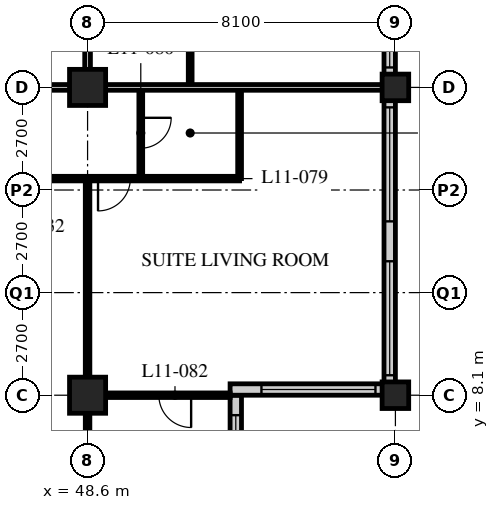
"""IFC4 building model, lengths in metres.
Left out: names, types, materials, properties, quantities, classifications, styles, units other than length and angle.
Written with IfcOpenShell. Run it as: python <this file> out.ifc"""

import sys

from ifc_helpers import new_model, si_unit, direction, frame, frame_2d, origin, origin_2d, place, context, subcontext, project, spatial, rectangle, hollow_rectangle, extrude, element, fill, save


model = new_model("IFC4")
c1 = context("Model", 3, precision=1e-05, world=origin(), true_north=direction((0.0, 1.0)))
c2 = subcontext(c1, "Body", "Model", "MODEL_VIEW")
j1 = project(units=[si_unit("LENGTHUNIT", "METRE"), si_unit("PLANEANGLEUNIT", "RADIAN")], contexts=[c1])
p1 = place(None, origin())
s1 = spatial("IfcSite", under=j1, at=p1, CompositionType="ELEMENT")
p2 = place(p1, origin())
s2 = spatial("IfcBuilding", under=s1, at=p2, CompositionType="ELEMENT")
p3 = place(p2, frame((0.0, 0.0, 50.0)))
s3 = spatial("IfcBuildingStorey", under=s2, at=p3, CompositionType="ELEMENT", Elevation=50.0)
for number, where, z_axis, x_axis in (
    (1, (48.6, 8.1, 0.0), (0.0, 0.0, 1.0), (1.0, 0.0, 0.0)),
    (2, (48.6, 16.2, 0.0), (0.0, 0.0, 1.0), (1.0, 0.0, 0.0)),
):
    element("IfcColumn", number, at=place(p3, frame(where, z_axis=z_axis, x_axis=x_axis)), inside=s3, PredefinedType="COLUMN", context=c2, shape_type="SweptSolid", body=[
        extrude(hollow_rectangle(XDim=0.95, YDim=0.95, WallThickness=0.095, at=origin_2d()), origin(), (0.0, 0.0, 1.0), 3.4),
    ])
for number, where, z_axis, x_axis in (
    (3, (56.7, 8.1, 0.0), (0.0, 0.0, 1.0), (1.0, 0.0, 0.0)),
    (4, (56.7, 16.2, 0.0), (0.0, 0.0, 1.0), (1.0, 0.0, 0.0)),
):
    element("IfcColumn", number, at=place(p3, frame(where, z_axis=z_axis, x_axis=x_axis)), inside=s3, PredefinedType="COLUMN", context=c2, shape_type="SweptSolid", body=[
        extrude(hollow_rectangle(XDim=0.7, YDim=0.7, WallThickness=0.06, at=origin_2d()), origin(), (0.0, 0.0, 1.0), 3.4),
    ])
p4 = place(p3, frame((52.5, 4.35, 0.0), z_axis=(0.0, 0.0, 1.0), x_axis=(0.0, 1.0, 0.0)))
e5 = element("IfcWall", 5, at=p4, inside=s3, PredefinedType="SOLIDWALL", context=c2, shape_type="SweptSolid", body=[
    extrude(rectangle(XDim=3.75, YDim=0.3, at=frame_2d((1.875, 0.0))), origin(), (0.0, 0.0, 1.0), 3.19),
])
p5 = place(p4, frame((0.225, 0.0, 0.9)))
e6 = element("IfcOpeningElement", 6, at=p5, cuts=e5, PredefinedType="OPENING", context=c2, shape_type="SweptSolid", body=[
    extrude(rectangle(XDim=3.0, YDim=1.5, at=frame_2d((1.5, 0.75))), frame((0.0, 0.16, 0.0), z_axis=(0.0, -1.0, 0.0), x_axis=(1.0, 0.0, 0.0)), (0.0, 0.0, 1.0), 0.32),
])
p6 = place(p3, frame((52.35, 8.25, 0.0), z_axis=(0.0, 0.0, 1.0), x_axis=(1.0, 0.0, 0.0)))
e7 = element("IfcWall", 7, at=p6, inside=s3, PredefinedType="SOLIDWALL", context=c2, shape_type="SweptSolid", body=[
    extrude(rectangle(XDim=4.35, YDim=0.3, at=frame_2d((2.175, 0.0))), origin(), (0.0, 0.0, 1.0), 3.19),
])
p7 = place(p6, frame((0.825, 0.0, 0.9)))
e8 = element("IfcOpeningElement", 8, at=p7, cuts=e7, PredefinedType="OPENING", context=c2, shape_type="SweptSolid", body=[
    extrude(rectangle(XDim=3.0, YDim=1.5, at=frame_2d((1.5, 0.75))), frame((0.0, 0.16, 0.0), z_axis=(0.0, -1.0, 0.0), x_axis=(1.0, 0.0, 0.0)), (0.0, 0.0, 1.0), 0.32),
])
p8 = place(p3, frame((56.55, 8.4, 0.0), z_axis=(0.0, 0.0, 1.0), x_axis=(0.0, 1.0, 0.0)))
e9 = element("IfcWall", 9, at=p8, inside=s3, PredefinedType="SOLIDWALL", context=c2, shape_type="SweptSolid", body=[
    extrude(rectangle(XDim=32.1, YDim=0.3, at=frame_2d((16.05, 0.0))), origin(), (0.0, 0.0, 1.0), 3.19),
])
p9 = place(p8, frame((0.225, 0.0, 0.9)))
e10 = element("IfcOpeningElement", 10, at=p9, cuts=e9, PredefinedType="OPENING", context=c2, shape_type="SweptSolid", body=[
    extrude(rectangle(XDim=3.0, YDim=2.0, at=frame_2d((1.5, 1.0))), frame((0.0, 0.16, 0.0), z_axis=(0.0, -1.0, 0.0), x_axis=(1.0, 0.0, 0.0)), (0.0, 0.0, 1.0), 0.32),
])
p10 = place(p8, frame((4.275, 0.0, 0.9)))
e11 = element("IfcOpeningElement", 11, at=p10, cuts=e9, PredefinedType="OPENING", context=c2, shape_type="SweptSolid", body=[
    extrude(rectangle(XDim=3.0, YDim=2.0, at=frame_2d((1.5, 1.0))), frame((0.0, 0.16, 0.0), z_axis=(0.0, -1.0, 0.0), x_axis=(1.0, 0.0, 0.0)), (0.0, 0.0, 1.0), 0.32),
])
p11 = place(p8, frame((8.325, 0.0, 0.9)))
e12 = element("IfcOpeningElement", 12, at=p11, cuts=e9, PredefinedType="OPENING", context=c2, shape_type="SweptSolid", body=[
    extrude(rectangle(XDim=3.0, YDim=2.0, at=frame_2d((1.5, 1.0))), frame((0.0, 0.16, 0.0), z_axis=(0.0, -1.0, 0.0), x_axis=(1.0, 0.0, 0.0)), (0.0, 0.0, 1.0), 0.32),
])
p12 = place(p8, frame((12.375, 0.0, 0.9)))
e13 = element("IfcOpeningElement", 13, at=p12, cuts=e9, PredefinedType="OPENING", context=c2, shape_type="SweptSolid", body=[
    extrude(rectangle(XDim=3.0, YDim=2.0, at=frame_2d((1.5, 1.0))), frame((0.0, 0.16, 0.0), z_axis=(0.0, -1.0, 0.0), x_axis=(1.0, 0.0, 0.0)), (0.0, 0.0, 1.0), 0.32),
])
p13 = place(p8, frame((16.425, 0.0, 0.9)))
e14 = element("IfcOpeningElement", 14, at=p13, cuts=e9, PredefinedType="OPENING", context=c2, shape_type="SweptSolid", body=[
    extrude(rectangle(XDim=3.0, YDim=2.0, at=frame_2d((1.5, 1.0))), frame((0.0, 0.16, 0.0), z_axis=(0.0, -1.0, 0.0), x_axis=(1.0, 0.0, 0.0)), (0.0, 0.0, 1.0), 0.32),
])
p14 = place(p8, frame((20.475, 0.0, 0.9)))
e15 = element("IfcOpeningElement", 15, at=p14, cuts=e9, PredefinedType="OPENING", context=c2, shape_type="SweptSolid", body=[
    extrude(rectangle(XDim=3.0, YDim=2.0, at=frame_2d((1.5, 1.0))), frame((0.0, 0.16, 0.0), z_axis=(0.0, -1.0, 0.0), x_axis=(1.0, 0.0, 0.0)), (0.0, 0.0, 1.0), 0.32),
])
p15 = place(p8, frame((24.525, 0.0, 0.9)))
e16 = element("IfcOpeningElement", 16, at=p15, cuts=e9, PredefinedType="OPENING", context=c2, shape_type="SweptSolid", body=[
    extrude(rectangle(XDim=3.0, YDim=2.0, at=frame_2d((1.5, 1.0))), frame((0.0, 0.16, 0.0), z_axis=(0.0, -1.0, 0.0), x_axis=(1.0, 0.0, 0.0)), (0.0, 0.0, 1.0), 0.32),
])
p16 = place(p8, frame((28.575, 0.0, 0.9)))
e17 = element("IfcOpeningElement", 17, at=p16, cuts=e9, PredefinedType="OPENING", context=c2, shape_type="SweptSolid", body=[
    extrude(rectangle(XDim=3.0, YDim=2.0, at=frame_2d((1.5, 1.0))), frame((0.0, 0.16, 0.0), z_axis=(0.0, -1.0, 0.0), x_axis=(1.0, 0.0, 0.0)), (0.0, 0.0, 1.0), 0.32),
])
p17 = place(p3, frame((8.1, 16.2, 0.0), z_axis=(0.0, 0.0, 1.0), x_axis=(1.0, 0.0, 0.0)))
e18 = element("IfcWall", 18, at=p17, inside=s3, PredefinedType="PARTITIONING", context=c2, shape_type="SweptSolid", body=[
    extrude(rectangle(XDim=40.5, YDim=0.15, at=frame_2d((20.25, 0.0))), origin(), (0.0, 0.0, 1.0), 2.578),
])
p18 = place(p17, frame((4.35, 0.0, 0.0)))
e19 = element("IfcOpeningElement", 19, at=p18, cuts=e18, PredefinedType="OPENING", context=c2, shape_type="SweptSolid", body=[
    extrude(rectangle(XDim=1.0, YDim=2.1, at=frame_2d((0.5, 1.05))), frame((0.0, 0.085, 0.0), z_axis=(0.0, -1.0, 0.0), x_axis=(1.0, 0.0, 0.0)), (0.0, 0.0, 1.0), 0.17),
])
p19 = place(p17, frame((10.85, 0.0, 0.0)))
e20 = element("IfcOpeningElement", 20, at=p19, cuts=e18, PredefinedType="OPENING", context=c2, shape_type="SweptSolid", body=[
    extrude(rectangle(XDim=1.0, YDim=2.1, at=frame_2d((0.5, 1.05))), frame((0.0, 0.085, 0.0), z_axis=(0.0, -1.0, 0.0), x_axis=(1.0, 0.0, 0.0)), (0.0, 0.0, 1.0), 0.17),
])
p20 = place(p17, frame((12.75, 0.0, 0.0)))
e21 = element("IfcOpeningElement", 21, at=p20, cuts=e18, PredefinedType="OPENING", context=c2, shape_type="SweptSolid", body=[
    extrude(rectangle(XDim=1.0, YDim=2.1, at=frame_2d((0.5, 1.05))), frame((0.0, 0.085, 0.0), z_axis=(0.0, -1.0, 0.0), x_axis=(1.0, 0.0, 0.0)), (0.0, 0.0, 1.0), 0.17),
])
p21 = place(p17, frame((18.95, 0.0, 0.0)))
e22 = element("IfcOpeningElement", 22, at=p21, cuts=e18, PredefinedType="OPENING", context=c2, shape_type="SweptSolid", body=[
    extrude(rectangle(XDim=1.0, YDim=2.1, at=frame_2d((0.5, 1.05))), frame((0.0, 0.085, 0.0), z_axis=(0.0, -1.0, 0.0), x_axis=(1.0, 0.0, 0.0)), (0.0, 0.0, 1.0), 0.17),
])
p22 = place(p17, frame((20.55, 0.0, 0.0)))
e23 = element("IfcOpeningElement", 23, at=p22, cuts=e18, PredefinedType="OPENING", context=c2, shape_type="SweptSolid", body=[
    extrude(rectangle(XDim=1.0, YDim=2.1, at=frame_2d((0.5, 1.05))), frame((0.0, 0.085, 0.0), z_axis=(0.0, -1.0, 0.0), x_axis=(1.0, 0.0, 0.0)), (0.0, 0.0, 1.0), 0.17),
])
p23 = place(p17, frame((27.05, 0.0, 0.0)))
e24 = element("IfcOpeningElement", 24, at=p23, cuts=e18, PredefinedType="OPENING", context=c2, shape_type="SweptSolid", body=[
    extrude(rectangle(XDim=1.0, YDim=2.1, at=frame_2d((0.5, 1.05))), frame((0.0, 0.085, 0.0), z_axis=(0.0, -1.0, 0.0), x_axis=(1.0, 0.0, 0.0)), (0.0, 0.0, 1.0), 0.17),
])
p24 = place(p17, frame((28.95, 0.0, 0.0)))
e25 = element("IfcOpeningElement", 25, at=p24, cuts=e18, PredefinedType="OPENING", context=c2, shape_type="SweptSolid", body=[
    extrude(rectangle(XDim=1.0, YDim=2.1, at=frame_2d((0.5, 1.05))), frame((0.0, 0.085, 0.0), z_axis=(0.0, -1.0, 0.0), x_axis=(1.0, 0.0, 0.0)), (0.0, 0.0, 1.0), 0.17),
])
p25 = place(p17, frame((34.85, 0.0, 0.0)))
e26 = element("IfcOpeningElement", 26, at=p25, cuts=e18, PredefinedType="OPENING", context=c2, shape_type="SweptSolid", body=[
    extrude(rectangle(XDim=1.0, YDim=2.1, at=frame_2d((0.5, 1.05))), frame((0.0, 0.085, 0.0), z_axis=(0.0, -1.0, 0.0), x_axis=(1.0, 0.0, 0.0)), (0.0, 0.0, 1.0), 0.17),
])
p26 = place(p17, frame((1.525, 0.0, 0.0)))
e27 = element("IfcOpeningElement", 27, at=p26, cuts=e18, PredefinedType="OPENING", context=c2, shape_type="SweptSolid", body=[
    extrude(rectangle(XDim=1.0, YDim=2.1, at=frame_2d((0.5, 1.05))), frame((0.0, 0.085, 0.0), z_axis=(0.0, -1.0, 0.0), x_axis=(1.0, 0.0, 0.0)), (0.0, 0.0, 1.0), 0.17),
])
p27 = place(p17, frame((37.975, 0.0, 0.0)))
e28 = element("IfcOpeningElement", 28, at=p27, cuts=e18, PredefinedType="OPENING", context=c2, shape_type="SweptSolid", body=[
    extrude(rectangle(XDim=1.0, YDim=2.1, at=frame_2d((0.5, 1.05))), frame((0.0, 0.085, 0.0), z_axis=(0.0, -1.0, 0.0), x_axis=(1.0, 0.0, 0.0)), (0.0, 0.0, 1.0), 0.17),
])
p28 = place(p3, frame((48.6, 16.2, 0.0), z_axis=(0.0, 0.0, 1.0), x_axis=(0.0, 1.0, 0.0)))
e29 = element("IfcWall", 29, at=p28, inside=s3, PredefinedType="PARTITIONING", context=c2, shape_type="SweptSolid", body=[
    extrude(rectangle(XDim=26.1, YDim=0.15, at=frame_2d((13.05, 0.0))), origin(), (0.0, 0.0, 1.0), 2.578),
])
p29 = place(p28, frame((2.75, 0.0, 0.0)))
e30 = element("IfcOpeningElement", 30, at=p29, cuts=e29, PredefinedType="OPENING", context=c2, shape_type="SweptSolid", body=[
    extrude(rectangle(XDim=1.0, YDim=2.1, at=frame_2d((0.5, 1.05))), frame((0.0, 0.085, 0.0), z_axis=(0.0, -1.0, 0.0), x_axis=(1.0, 0.0, 0.0)), (0.0, 0.0, 1.0), 0.17),
])
p30 = place(p28, frame((4.35, 0.0, 0.0)))
e31 = element("IfcOpeningElement", 31, at=p30, cuts=e29, PredefinedType="OPENING", context=c2, shape_type="SweptSolid", body=[
    extrude(rectangle(XDim=1.0, YDim=2.1, at=frame_2d((0.5, 1.05))), frame((0.0, 0.085, 0.0), z_axis=(0.0, -1.0, 0.0), x_axis=(1.0, 0.0, 0.0)), (0.0, 0.0, 1.0), 0.17),
])
p31 = place(p28, frame((10.85, 0.0, 0.0)))
e32 = element("IfcOpeningElement", 32, at=p31, cuts=e29, PredefinedType="OPENING", context=c2, shape_type="SweptSolid", body=[
    extrude(rectangle(XDim=1.0, YDim=2.1, at=frame_2d((0.5, 1.05))), frame((0.0, 0.085, 0.0), z_axis=(0.0, -1.0, 0.0), x_axis=(1.0, 0.0, 0.0)), (0.0, 0.0, 1.0), 0.17),
])
p32 = place(p28, frame((12.45, 0.0, 0.0)))
e33 = element("IfcOpeningElement", 33, at=p32, cuts=e29, PredefinedType="OPENING", context=c2, shape_type="SweptSolid", body=[
    extrude(rectangle(XDim=1.0, YDim=2.1, at=frame_2d((0.5, 1.05))), frame((0.0, 0.085, 0.0), z_axis=(0.0, -1.0, 0.0), x_axis=(1.0, 0.0, 0.0)), (0.0, 0.0, 1.0), 0.17),
])
p33 = place(p28, frame((18.65, 0.0, 0.0)))
e34 = element("IfcOpeningElement", 34, at=p33, cuts=e29, PredefinedType="OPENING", context=c2, shape_type="SweptSolid", body=[
    extrude(rectangle(XDim=1.0, YDim=2.1, at=frame_2d((0.5, 1.05))), frame((0.0, 0.085, 0.0), z_axis=(0.0, -1.0, 0.0), x_axis=(1.0, 0.0, 0.0)), (0.0, 0.0, 1.0), 0.17),
])
p34 = place(p28, frame((22.7, 0.0, 0.0)))
e35 = element("IfcOpeningElement", 35, at=p34, cuts=e29, PredefinedType="OPENING", context=c2, shape_type="SweptSolid", body=[
    extrude(rectangle(XDim=1.0, YDim=2.1, at=frame_2d((0.5, 1.05))), frame((0.0, 0.085, 0.0), z_axis=(0.0, -1.0, 0.0), x_axis=(1.0, 0.0, 0.0)), (0.0, 0.0, 1.0), 0.17),
])
p35 = place(p3, frame((51.3, 16.2, 0.0), z_axis=(0.0, 0.0, 1.0), x_axis=(0.0, 1.0, 0.0)))
e36 = element("IfcWall", 36, at=p35, inside=s3, PredefinedType="PARTITIONING", context=c2, shape_type="SweptSolid", body=[
    extrude(rectangle(XDim=2.6, YDim=0.1, at=frame_2d((1.3, 0.0))), origin(), (0.0, 0.0, 1.0), 3.19),
])
p36 = place(p3, frame((44.55, 13.8, 0.0), z_axis=(0.0, 0.0, 1.0), x_axis=(1.0, 0.0, 0.0)))
e37 = element("IfcWall", 37, at=p36, inside=s3, PredefinedType="PARTITIONING", context=c2, shape_type="SweptSolid", body=[
    extrude(rectangle(XDim=8.05, YDim=0.12, at=frame_2d((4.025, 0.0))), origin(), (0.0, 0.0, 1.0), 3.19),
])
p37 = place(p36, frame((0.475, 0.0, 0.0)))
e38 = element("IfcOpeningElement", 38, at=p37, cuts=e37, PredefinedType="OPENING", context=c2, shape_type="SweptSolid", body=[
    extrude(rectangle(XDim=0.85, YDim=2.1, at=frame_2d((0.425, 1.05))), frame((0.0, 0.07, 0.0), z_axis=(0.0, -1.0, 0.0), x_axis=(1.0, 0.0, 0.0)), (0.0, 0.0, 1.0), 0.14),
])
p38 = place(p36, frame((4.325, 0.0, 0.0)))
e39 = element("IfcOpeningElement", 39, at=p38, cuts=e37, PredefinedType="OPENING", context=c2, shape_type="SweptSolid", body=[
    extrude(rectangle(XDim=0.85, YDim=2.1, at=frame_2d((0.425, 1.05))), frame((0.0, 0.07, 0.0), z_axis=(0.0, -1.0, 0.0), x_axis=(1.0, 0.0, 0.0)), (0.0, 0.0, 1.0), 0.14),
])
p39 = place(p3, frame((50.0, 16.2, 0.0), z_axis=(0.0, 0.0, 1.0), x_axis=(0.0, -1.0, 0.0)))
e40 = element("IfcWall", 40, at=p39, inside=s3, PredefinedType="PARTITIONING", context=c2, shape_type="SweptSolid", body=[
    extrude(rectangle(XDim=2.4, YDim=0.1, at=frame_2d((1.2, 0.0))), origin(), (0.0, 0.0, 1.0), 3.19),
])
p40 = place(p39, frame((0.8, 0.0, 0.0)))
e41 = element("IfcOpeningElement", 41, at=p40, cuts=e40, PredefinedType="OPENING", context=c2, shape_type="SweptSolid", body=[
    extrude(rectangle(XDim=0.8, YDim=2.1, at=frame_2d((0.4, 1.05))), frame((0.0, 0.06, 0.0), z_axis=(0.0, -1.0, 0.0), x_axis=(1.0, 0.0, 0.0)), (0.0, 0.0, 1.0), 0.12),
])
p41 = place(p3, frame((52.6, 16.2, 0.0), z_axis=(0.0, 0.0, 1.0), x_axis=(0.0, -1.0, 0.0)))
e42 = element("IfcWall", 42, at=p41, inside=s3, PredefinedType="PARTITIONING", context=c2, shape_type="SweptSolid", body=[
    extrude(rectangle(XDim=2.4, YDim=0.1, at=frame_2d((1.2, 0.0))), origin(), (0.0, 0.0, 1.0), 3.19),
])
p42 = place(p3, frame((48.6, 13.8, 0.0), z_axis=(0.0, 0.0, 1.0), x_axis=(0.0, -1.0, 0.0)))
e43 = element("IfcWall", 43, at=p42, inside=s3, PredefinedType="PARTITIONING", context=c2, shape_type="SweptSolid", body=[
    extrude(rectangle(XDim=9.45, YDim=0.12, at=frame_2d((4.725, 0.0))), origin(), (0.0, 0.0, 1.0), 2.578),
])
p43 = place(p3, frame((48.6, 8.1, 0.0), z_axis=(0.0, 0.0, 1.0), x_axis=(1.0, 0.0, 0.0)))
e44 = element("IfcWall", 44, at=p43, inside=s3, PredefinedType="PARTITIONING", context=c2, shape_type="SweptSolid", body=[
    extrude(rectangle(XDim=3.75, YDim=0.12, at=frame_2d((1.875, 0.0))), origin(), (0.0, 0.0, 1.0), 2.578),
])
p44 = place(p43, frame((1.875, 0.0, 0.0)))
e45 = element("IfcOpeningElement", 45, at=p44, cuts=e44, PredefinedType="OPENING", context=c2, shape_type="SweptSolid", body=[
    extrude(rectangle(XDim=0.85, YDim=2.1, at=frame_2d((0.425, 1.05))), frame((0.0, 0.07, 0.0), z_axis=(0.0, -1.0, 0.0), x_axis=(1.0, 0.0, 0.0)), (0.0, 0.0, 1.0), 0.14),
])
p45 = place(p3, frame((48.6, 16.2, 0.0), z_axis=(0.0, 0.0, 1.0), x_axis=(1.0, 0.0, 0.0)))
e46 = element("IfcWall", 46, at=p45, inside=s3, PredefinedType="PARTITIONING", context=c2, shape_type="SweptSolid", body=[
    extrude(rectangle(XDim=7.8, YDim=0.15, at=frame_2d((3.9, 0.0))), origin(), (0.0, 0.0, 1.0), 2.578),
])
p46 = place(p5, origin())
e47 = element("IfcWindow", 47, at=p46, inside=s3, PartitioningType="SINGLE_PANEL", PredefinedType="WINDOW", context=c2, shape_type="SweptSolid", body=[
    extrude(rectangle(XDim=3.0, YDim=1.5, at=frame_2d((1.5, 0.75))), frame((0.0, 0.03, 0.0), z_axis=(0.0, -1.0, 0.0), x_axis=(1.0, 0.0, 0.0)), (0.0, 0.0, 1.0), 0.06),
])
fill(e6, e47)
p47 = place(p7, origin())
e48 = element("IfcWindow", 48, at=p47, inside=s3, PartitioningType="SINGLE_PANEL", PredefinedType="WINDOW", context=c2, shape_type="SweptSolid", body=[
    extrude(rectangle(XDim=3.0, YDim=1.5, at=frame_2d((1.5, 0.75))), frame((0.0, 0.03, 0.0), z_axis=(0.0, -1.0, 0.0), x_axis=(1.0, 0.0, 0.0)), (0.0, 0.0, 1.0), 0.06),
])
fill(e8, e48)
p48 = place(p9, origin())
e49 = element("IfcWindow", 49, at=p48, inside=s3, PartitioningType="SINGLE_PANEL", PredefinedType="WINDOW", context=c2, shape_type="SweptSolid", body=[
    extrude(rectangle(XDim=3.0, YDim=2.0, at=frame_2d((1.5, 1.0))), frame((0.0, 0.03, 0.0), z_axis=(0.0, -1.0, 0.0), x_axis=(1.0, 0.0, 0.0)), (0.0, 0.0, 1.0), 0.06),
])
fill(e10, e49)
p49 = place(p10, origin())
e50 = element("IfcWindow", 50, at=p49, inside=s3, PartitioningType="SINGLE_PANEL", PredefinedType="WINDOW", context=c2, shape_type="SweptSolid", body=[
    extrude(rectangle(XDim=3.0, YDim=2.0, at=frame_2d((1.5, 1.0))), frame((0.0, 0.03, 0.0), z_axis=(0.0, -1.0, 0.0), x_axis=(1.0, 0.0, 0.0)), (0.0, 0.0, 1.0), 0.06),
])
fill(e11, e50)
p50 = place(p11, origin())
e51 = element("IfcWindow", 51, at=p50, inside=s3, PartitioningType="SINGLE_PANEL", PredefinedType="WINDOW", context=c2, shape_type="SweptSolid", body=[
    extrude(rectangle(XDim=3.0, YDim=2.0, at=frame_2d((1.5, 1.0))), frame((0.0, 0.03, 0.0), z_axis=(0.0, -1.0, 0.0), x_axis=(1.0, 0.0, 0.0)), (0.0, 0.0, 1.0), 0.06),
])
fill(e12, e51)
p51 = place(p40, origin())
e52 = element("IfcDoor", 52, at=p51, inside=s3, OperationType="SINGLE_SWING_LEFT", PredefinedType="DOOR", context=c2, shape_type="SweptSolid", body=[
    extrude(rectangle(XDim=0.8, YDim=2.1, at=frame_2d((0.4, 1.05))), frame((0.0, 0.025, 0.0), z_axis=(0.0, -1.0, 0.0), x_axis=(1.0, 0.0, 0.0)), (0.0, 0.0, 1.0), 0.05),
])
fill(e41, e52)
p52 = place(p38, origin())
e53 = element("IfcDoor", 53, at=p52, inside=s3, OperationType="SINGLE_SWING_RIGHT", PredefinedType="DOOR", context=c2, shape_type="SweptSolid", body=[
    extrude(rectangle(XDim=0.85, YDim=2.1, at=frame_2d((0.425, 1.05))), frame((0.0, 0.025, 0.0), z_axis=(0.0, -1.0, 0.0), x_axis=(1.0, 0.0, 0.0)), (0.0, 0.0, 1.0), 0.05),
])
fill(e39, e53)
p53 = place(p44, origin())
e54 = element("IfcDoor", 54, at=p53, inside=s3, OperationType="SINGLE_SWING_LEFT", PredefinedType="DOOR", context=c2, shape_type="SweptSolid", body=[
    extrude(rectangle(XDim=0.85, YDim=2.1, at=frame_2d((0.425, 1.05))), frame((0.0, 0.025, 0.0), z_axis=(0.0, -1.0, 0.0), x_axis=(1.0, 0.0, 0.0)), (0.0, 0.0, 1.0), 0.05),
])
fill(e45, e54)
save(model, sys.argv[1])
